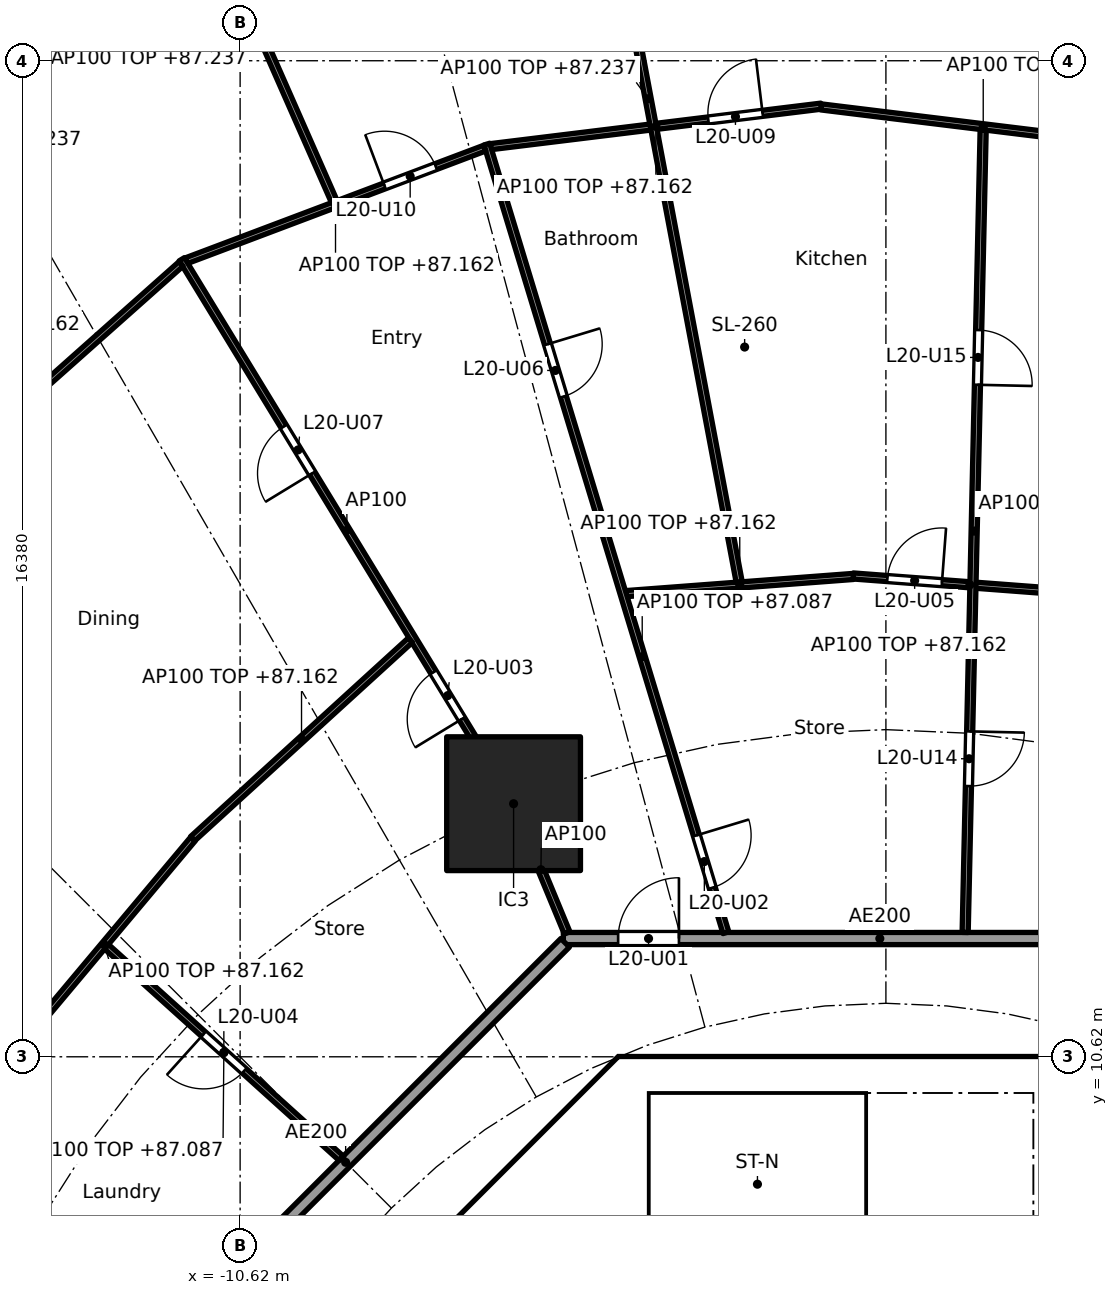
"""IFC4 building model, lengths in metres.
Left out: names, types, materials, properties, quantities, classifications, styles, units other than length and angle.
Written with IfcOpenShell. Run it as: python <this file> out.ifc"""

import sys

from ifc_helpers import new_model, si_unit, direction, frame, frame_2d, origin, origin_2d, place, context, subcontext, project, spatial, polyline, rectangle, outline, extrude, element, fill, save


model = new_model("IFC4")
c1 = context("Model", 3, precision=1e-05, world=origin(), true_north=direction((0.0, 1.0)))
c2 = subcontext(c1, "Body", "Model", "MODEL_VIEW")
j1 = project(units=[si_unit("LENGTHUNIT", "METRE"), si_unit("PLANEANGLEUNIT", "RADIAN")], contexts=[c1])
p1 = place(None, origin())
s1 = spatial("IfcSite", under=j1, at=p1, CompositionType="ELEMENT")
p2 = place(p1, origin())
s2 = spatial("IfcBuilding", under=s1, at=p2, CompositionType="ELEMENT")
p3 = place(p2, frame((0.0, 0.0, 84.4)))
s3 = spatial("IfcBuildingStorey", under=s2, at=p3, CompositionType="ELEMENT", Elevation=84.4)
p4 = place(p3, frame((-6.123, 14.782, 0.0), z_axis=(0.0, 0.0, 1.0), x_axis=(1.0, 0.0, 0.0)))
e1 = element("IfcColumn", 1, at=p4, inside=s3, PredefinedType="COLUMN", context=c2, shape_type="SweptSolid", body=[
    extrude(rectangle(XDim=2.2, YDim=2.2, at=origin_2d()), origin(), (0.0, 0.0, 1.0), 3.7),
])
p5 = place(p3, frame((-4.613, 9.988, 0.0), z_axis=(0.0, 0.0, 1.0), x_axis=(-0.707106781187, -0.707106781187, 0.0)))
e2 = element("IfcWall", 2, at=p5, inside=s3, PredefinedType="SHEAR", context=c2, shape_type="SweptSolid", body=[
    extrude(rectangle(XDim=7.602, YDim=0.6, at=frame_2d((3.801, 0.0))), origin(), (0.0, 0.0, 1.0), 3.44),
])
p6 = place(p5, frame((0.351, 0.0, 0.0)))
e3 = element("IfcOpeningElement", 3, at=p6, cuts=e2, PredefinedType="OPENING", context=c2, shape_type="SweptSolid", body=[
    extrude(rectangle(XDim=1.1, YDim=2.1, at=frame_2d((0.55, 1.05))), frame((0.0, 0.31, 0.0), z_axis=(0.0, -1.0, 0.0), x_axis=(1.0, 0.0, 0.0)), (0.0, 0.0, 1.0), 0.62),
])
p7 = place(p3, frame((-5.8, 4.3, 0.0), z_axis=(0.0, 0.0, 1.0), x_axis=(0.0, 1.0, 0.0)))
e4 = element("IfcWall", 4, at=p7, inside=s3, PredefinedType="PARTITIONING", context=c2, shape_type="SweptSolid", body=[
    extrude(rectangle(XDim=3.927, YDim=0.15, at=frame_2d((1.963, 0.0))), origin(), (0.0, 0.0, 1.0), 3.44),
])
p8 = place(p7, frame((1.551, 0.0, 0.0)))
e5 = element("IfcOpeningElement", 5, at=p8, cuts=e4, PredefinedType="OPENING", context=c2, shape_type="SweptSolid", body=[
    extrude(rectangle(XDim=0.9, YDim=2.1, at=frame_2d((0.45, 1.05))), frame((0.0, 0.085, 0.0), z_axis=(0.0, -1.0, 0.0), x_axis=(1.0, 0.0, 0.0)), (0.0, 0.0, 1.0), 0.17),
])
p9 = place(p3, origin())
e6 = element("IfcWall", 6, at=p9, inside=s3, PredefinedType="SHEAR", context=c2, shape_type="SweptSolid", body=[
    extrude(outline(polyline([(-4.152, 10.025), (-4.401, 9.776), (-4.825, 10.2), (-4.401, 10.625), (4.401, 10.625), (4.825, 10.2), (4.401, 9.776), (4.152, 10.025), (-4.152, 10.025)])), origin(), (0.0, 0.0, 1.0), 3.44),
])
p10 = place(p3, origin())
e7 = element("IfcWall", 7, at=p10, inside=s3, PredefinedType="SOLIDWALL", context=c2, shape_type="SweptSolid", body=[
    extrude(outline(polyline([(-3.9, 7.025), (-4.1, 7.025), (-4.1, 10.025), (-3.9, 10.025), (-3.9, 7.025)])), origin(), (0.0, 0.0, 1.0), 3.44),
])
p11 = place(p3, frame((5.104, 12.565, 0.0), z_axis=(0.0, 0.0, 1.0), x_axis=(-1.0, 0.0, 0.0)))
e8 = element("IfcWall", 8, at=p11, inside=s3, PredefinedType="PARTITIONING", context=c2, shape_type="SweptSolid", body=[
    extrude(rectangle(XDim=10.409, YDim=0.2, at=frame_2d((5.205, 0.0))), origin(), (0.0, 0.0, 1.0), 3.44),
])
p12 = place(p11, frame((8.508, 0.0, 0.0)))
e9 = element("IfcOpeningElement", 9, at=p12, cuts=e8, PredefinedType="OPENING", context=c2, shape_type="SweptSolid", body=[
    extrude(rectangle(XDim=1.0, YDim=2.1, at=frame_2d((0.5, 1.05))), frame((0.0, 0.11, 0.0), z_axis=(0.0, -1.0, 0.0), x_axis=(1.0, 0.0, 0.0)), (0.0, 0.0, 1.0), 0.22),
])
p13 = place(p3, frame((-5.275, 12.494, 0.0), z_axis=(0.0, 0.0, 1.0), x_axis=(-0.707106781187, -0.707106781187, 0.0)))
e10 = element("IfcWall", 10, at=p13, inside=s3, PredefinedType="PARTITIONING", context=c2, shape_type="SweptSolid", body=[
    extrude(rectangle(XDim=10.209, YDim=0.2, at=frame_2d((5.104, 0.0))), origin(), (0.0, 0.0, 1.0), 3.44),
])
p14 = place(p3, frame((3.299, 18.237, 0.0), z_axis=(0.0, 0.0, 1.0), x_axis=(-0.997152243414, 0.075414875552, 0.0)))
e11 = element("IfcWall", 11, at=p14, inside=s3, PredefinedType="PARTITIONING", context=c2, shape_type="SweptSolid", body=[
    extrude(rectangle(XDim=3.846, YDim=0.1, at=frame_2d((1.923, 0.0))), origin(), (0.0, 0.0, 1.0), 2.762),
])
p15 = place(p14, frame((2.385, 0.0, 0.0)))
e12 = element("IfcOpeningElement", 12, at=p15, cuts=e11, PredefinedType="OPENING", context=c2, shape_type="SweptSolid", body=[
    extrude(rectangle(XDim=0.9, YDim=2.1, at=frame_2d((0.45, 1.05))), frame((0.0, 0.06, 0.0), z_axis=(0.0, -1.0, 0.0), x_axis=(1.0, 0.0, 0.0)), (0.0, 0.0, 1.0), 0.12),
])
p16 = place(p3, frame((4.267, 25.587, 0.0), z_axis=(0.0, 0.0, 1.0), x_axis=(-0.992576206119, 0.121624319302, 0.0)))
e13 = element("IfcWall", 13, at=p16, inside=s3, PredefinedType="PARTITIONING", context=c2, shape_type="SweptSolid", body=[
    extrude(rectangle(XDim=5.374, YDim=0.1, at=frame_2d((2.687, 0.0))), origin(), (0.0, 0.0, 1.0), 2.762),
])
p17 = place(p3, frame((1.303, 12.665, 0.0), z_axis=(0.0, 0.0, 1.0), x_axis=(0.022412244057, 0.999748814111, 0.0)))
e14 = element("IfcWall", 14, at=p17, inside=s3, PredefinedType="PARTITIONING", context=c2, shape_type="SweptSolid", body=[
    extrude(rectangle(XDim=13.203, YDim=0.1, at=frame_2d((6.601, 0.0))), origin(), (0.0, 0.0, 1.0), 2.687),
])
p18 = place(p17, frame((2.407, 0.0, 0.0)))
e15 = element("IfcOpeningElement", 15, at=p18, cuts=e14, PredefinedType="OPENING", context=c2, shape_type="SweptSolid", body=[
    extrude(rectangle(XDim=0.9, YDim=2.1, at=frame_2d((0.45, 1.05))), frame((0.0, 0.06, 0.0), z_axis=(0.0, -1.0, 0.0), x_axis=(1.0, 0.0, 0.0)), (0.0, 0.0, 1.0), 0.12),
])
p19 = place(p17, frame((9.009, 0.0, 0.0)))
e16 = element("IfcOpeningElement", 16, at=p19, cuts=e14, PredefinedType="OPENING", context=c2, shape_type="SweptSolid", body=[
    extrude(rectangle(XDim=0.9, YDim=2.1, at=frame_2d((0.45, 1.05))), frame((0.0, 0.06, 0.0), z_axis=(0.0, -1.0, 0.0), x_axis=(1.0, 0.0, 0.0)), (0.0, 0.0, 1.0), 0.12),
])
p20 = place(p3, frame((-0.536, 18.519, 0.0), z_axis=(0.0, 0.0, 1.0), x_axis=(-0.99715294352, -0.075405618017, 0.0)))
e17 = element("IfcWall", 17, at=p20, inside=s3, PredefinedType="PARTITIONING", context=c2, shape_type="SweptSolid", body=[
    extrude(rectangle(XDim=3.746, YDim=0.1, at=frame_2d((1.873, 0.0))), origin(), (0.0, 0.0, 1.0), 2.762),
])
p21 = place(p3, frame((-1.066, 26.253, 0.0), z_axis=(0.0, 0.0, 1.0), x_axis=(-0.992574853421, -0.121635358166, 0.0)))
e18 = element("IfcWall", 18, at=p21, inside=s3, PredefinedType="PARTITIONING", context=c2, shape_type="SweptSolid", body=[
    extrude(rectangle(XDim=5.473, YDim=0.1, at=frame_2d((2.737, 0.0))), origin(), (0.0, 0.0, 1.0), 2.762),
])
p22 = place(p21, frame((0.969, 0.0, 0.0)))
e19 = element("IfcOpeningElement", 19, at=p22, cuts=e18, PredefinedType="OPENING", context=c2, shape_type="SweptSolid", body=[
    extrude(rectangle(XDim=0.9, YDim=2.1, at=frame_2d((0.45, 1.05))), frame((0.0, 0.06, 0.0), z_axis=(0.0, -1.0, 0.0), x_axis=(1.0, 0.0, 0.0)), (0.0, 0.0, 1.0), 0.12),
])
p23 = place(p3, frame((-2.413, 18.427, 0.0), z_axis=(0.0, 0.0, 1.0), x_axis=(-0.185126823719, 0.982714637695, 0.0)))
e20 = element("IfcWall", 20, at=p23, inside=s3, PredefinedType="PARTITIONING", context=c2, shape_type="SweptSolid", body=[
    extrude(rectangle(XDim=16.176, YDim=0.1, at=frame_2d((8.088, 0.0))), origin(), (0.0, 0.0, 1.0), 2.837),
])
p24 = place(p3, frame((-2.631, 12.66, 0.0), z_axis=(0.0, 0.0, 1.0), x_axis=(-0.290161396499, 0.956977723869, 0.0)))
e21 = element("IfcWall", 21, at=p24, inside=s3, PredefinedType="PARTITIONING", context=c2, shape_type="SweptSolid", body=[
    extrude(rectangle(XDim=13.552, YDim=0.1, at=frame_2d((6.776, 0.0))), origin(), (0.0, 0.0, 1.0), 2.687),
])
p25 = place(p24, frame((0.772, 0.0, 0.0)))
e22 = element("IfcOpeningElement", 22, at=p25, cuts=e21, PredefinedType="OPENING", context=c2, shape_type="SweptSolid", body=[
    extrude(rectangle(XDim=0.9, YDim=2.1, at=frame_2d((0.45, 1.05))), frame((0.0, 0.06, 0.0), z_axis=(0.0, -1.0, 0.0), x_axis=(1.0, 0.0, 0.0)), (0.0, 0.0, 1.0), 0.12),
])
p26 = place(p24, frame((9.212, 0.0, 0.0)))
e23 = element("IfcOpeningElement", 23, at=p26, cuts=e21, PredefinedType="OPENING", context=c2, shape_type="SweptSolid", body=[
    extrude(rectangle(XDim=0.9, YDim=2.1, at=frame_2d((0.45, 1.05))), frame((0.0, 0.06, 0.0), z_axis=(0.0, -1.0, 0.0), x_axis=(1.0, 0.0, 0.0)), (0.0, 0.0, 1.0), 0.12),
])
p27 = place(p3, frame((-6.596, 25.563, 0.0), z_axis=(0.0, 0.0, 1.0), x_axis=(-0.9356162121, -0.353018843201, 0.0)))
e24 = element("IfcWall", 24, at=p27, inside=s3, PredefinedType="PARTITIONING", context=c2, shape_type="SweptSolid", body=[
    extrude(rectangle(XDim=5.249, YDim=0.1, at=frame_2d((2.625, 0.0))), origin(), (0.0, 0.0, 1.0), 2.762),
])
p28 = place(p27, frame((0.862, 0.0, 0.0)))
e25 = element("IfcOpeningElement", 25, at=p28, cuts=e24, PredefinedType="OPENING", context=c2, shape_type="SweptSolid", body=[
    extrude(rectangle(XDim=0.9, YDim=2.1, at=frame_2d((0.45, 1.05))), frame((0.0, 0.06, 0.0), z_axis=(0.0, -1.0, 0.0), x_axis=(1.0, 0.0, 0.0)), (0.0, 0.0, 1.0), 0.12),
])
p29 = place(p3, frame((-9.072, 24.683, 0.0), z_axis=(0.0, 0.0, 1.0), x_axis=(-0.403192911159, 0.915115007194, 0.0)))
e26 = element("IfcWall", 26, at=p29, inside=s3, PredefinedType="PARTITIONING", context=c2, shape_type="SweptSolid", body=[
    extrude(rectangle(XDim=8.211, YDim=0.1, at=frame_2d((4.106, 0.0))), origin(), (0.0, 0.0, 1.0), 2.837),
])
p30 = place(p29, frame((3.656, 0.0, 0.0)))
e27 = element("IfcOpeningElement", 27, at=p30, cuts=e26, PredefinedType="OPENING", context=c2, shape_type="SweptSolid", body=[
    extrude(rectangle(XDim=0.9, YDim=2.1, at=frame_2d((0.45, 1.05))), frame((0.0, 0.06, 0.0), z_axis=(0.0, -1.0, 0.0), x_axis=(1.0, 0.0, 0.0)), (0.0, 0.0, 1.0), 0.12),
])
p31 = place(p3, frame((-5.243, 12.657, 0.0), z_axis=(0.0, 0.0, 1.0), x_axis=(-0.382703272338, 0.923871314276, 0.0)))
e28 = element("IfcWall", 28, at=p31, inside=s3, PredefinedType="PARTITIONING", context=c2, shape_type="SweptSolid", body=[
    extrude(rectangle(XDim=2.249, YDim=0.1, at=frame_2d((1.125, 0.0))), origin(), (0.0, 0.0, 1.0), 3.44),
])
p32 = place(p3, frame((-6.149, 14.825, 0.0), z_axis=(0.0, 0.0, 1.0), x_axis=(-0.520411490252, 0.853915616917, 0.0)))
e29 = element("IfcWall", 29, at=p32, inside=s3, PredefinedType="PARTITIONING", context=c2, shape_type="SweptSolid", body=[
    extrude(rectangle(XDim=10.435, YDim=0.1, at=frame_2d((5.218, 0.0))), origin(), (0.0, 0.0, 1.0), 3.44),
])
p33 = place(p32, frame((1.582, 0.0, 0.0)))
e30 = element("IfcOpeningElement", 30, at=p33, cuts=e29, PredefinedType="OPENING", context=c2, shape_type="SweptSolid", body=[
    extrude(rectangle(XDim=0.9, YDim=2.1, at=frame_2d((0.45, 1.05))), frame((0.0, 0.06, 0.0), z_axis=(0.0, -1.0, 0.0), x_axis=(1.0, 0.0, 0.0)), (0.0, 0.0, 1.0), 0.12),
])
p34 = place(p32, frame((6.312, 0.0, 0.0)))
e31 = element("IfcOpeningElement", 31, at=p34, cuts=e29, PredefinedType="OPENING", context=c2, shape_type="SweptSolid", body=[
    extrude(rectangle(XDim=0.9, YDim=2.1, at=frame_2d((0.45, 1.05))), frame((0.0, 0.06, 0.0), z_axis=(0.0, -1.0, 0.0), x_axis=(1.0, 0.0, 0.0)), (0.0, 0.0, 1.0), 0.12),
])
p35 = place(p3, frame((-7.82, 17.472, 0.0), z_axis=(0.0, 0.0, 1.0), x_axis=(-0.73885182489, -0.67386792538, 0.0)))
e32 = element("IfcWall", 32, at=p35, inside=s3, PredefinedType="PARTITIONING", context=c2, shape_type="SweptSolid", body=[
    extrude(rectangle(XDim=4.846, YDim=0.1, at=frame_2d((2.423, 0.0))), origin(), (0.0, 0.0, 1.0), 2.762),
])
p36 = place(p3, frame((-11.591, 23.66, 0.0), z_axis=(0.0, 0.0, 1.0), x_axis=(-0.747429278403, -0.664341383466, 0.0)))
e33 = element("IfcWall", 33, at=p36, inside=s3, PredefinedType="PARTITIONING", context=c2, shape_type="SweptSolid", body=[
    extrude(rectangle(XDim=6.073, YDim=0.1, at=frame_2d((3.037, 0.0))), origin(), (0.0, 0.0, 1.0), 2.762),
])
p37 = place(p3, frame((-11.396, 14.202, 0.0), z_axis=(0.0, 0.0, 1.0), x_axis=(-0.642483859922, -0.766299216847, 0.0)))
e34 = element("IfcWall", 34, at=p37, inside=s3, PredefinedType="PARTITIONING", context=c2, shape_type="SweptSolid", body=[
    extrude(rectangle(XDim=4.537, YDim=0.1, at=frame_2d((2.269, 0.0))), origin(), (0.0, 0.0, 1.0), 2.762),
])
p38 = place(p3, frame((-8.959, 8.952, 0.0), z_axis=(0.0, 0.0, 1.0), x_axis=(-0.742686144764, 0.669639672045, 0.0)))
e35 = element("IfcWall", 35, at=p38, inside=s3, PredefinedType="PARTITIONING", context=c2, shape_type="SweptSolid", body=[
    extrude(rectangle(XDim=5.194, YDim=0.1, at=frame_2d((2.597, 0.0))), origin(), (0.0, 0.0, 1.0), 2.687),
])
p39 = place(p38, frame((2.147, 0.0, 0.0)))
e36 = element("IfcOpeningElement", 36, at=p39, cuts=e35, PredefinedType="OPENING", context=c2, shape_type="SweptSolid", body=[
    extrude(rectangle(XDim=0.9, YDim=2.1, at=frame_2d((0.45, 1.05))), frame((0.0, 0.06, 0.0), z_axis=(0.0, -1.0, 0.0), x_axis=(1.0, 0.0, 0.0)), (0.0, 0.0, 1.0), 0.12),
])
p40 = place(p6, origin())
e37 = element("IfcDoor", 37, at=p40, inside=s3, OperationType="SINGLE_SWING_LEFT", PredefinedType="DOOR", context=c2, shape_type="SweptSolid", body=[
    extrude(rectangle(XDim=1.1, YDim=2.1, at=frame_2d((0.55, 1.05))), frame((0.0, 0.025, 0.0), z_axis=(0.0, -1.0, 0.0), x_axis=(1.0, 0.0, 0.0)), (0.0, 0.0, 1.0), 0.05),
])
fill(e3, e37)
p41 = place(p12, frame((1.0, 0.0, 0.0), x_axis=(-1.0, 0.0, 0.0)))
e38 = element("IfcDoor", 38, at=p41, inside=s3, OperationType="SINGLE_SWING_RIGHT", PredefinedType="DOOR", context=c2, shape_type="SweptSolid", body=[
    extrude(rectangle(XDim=1.0, YDim=2.1, at=frame_2d((0.5, 1.05))), frame((0.0, 0.025, 0.0), z_axis=(0.0, -1.0, 0.0), x_axis=(1.0, 0.0, 0.0)), (0.0, 0.0, 1.0), 0.05),
])
fill(e9, e38)
p42 = place(p25, frame((0.9, 0.0, 0.0), x_axis=(-1.0, 0.0, 0.0)))
e39 = element("IfcDoor", 39, at=p42, inside=s3, OperationType="SINGLE_SWING_LEFT", PredefinedType="DOOR", context=c2, shape_type="SweptSolid", body=[
    extrude(rectangle(XDim=0.9, YDim=2.1, at=frame_2d((0.45, 1.05))), frame((0.0, 0.025, 0.0), z_axis=(0.0, -1.0, 0.0), x_axis=(1.0, 0.0, 0.0)), (0.0, 0.0, 1.0), 0.05),
])
fill(e22, e39)
p43 = place(p33, origin())
e40 = element("IfcDoor", 40, at=p43, inside=s3, OperationType="SINGLE_SWING_LEFT", PredefinedType="DOOR", context=c2, shape_type="SweptSolid", body=[
    extrude(rectangle(XDim=0.9, YDim=2.1, at=frame_2d((0.45, 1.05))), frame((0.0, 0.025, 0.0), z_axis=(0.0, -1.0, 0.0), x_axis=(1.0, 0.0, 0.0)), (0.0, 0.0, 1.0), 0.05),
])
fill(e30, e40)
p44 = place(p39, origin())
e41 = element("IfcDoor", 41, at=p44, inside=s3, OperationType="SINGLE_SWING_RIGHT", PredefinedType="DOOR", context=c2, shape_type="SweptSolid", body=[
    extrude(rectangle(XDim=0.9, YDim=2.1, at=frame_2d((0.45, 1.05))), frame((0.0, 0.025, 0.0), z_axis=(0.0, -1.0, 0.0), x_axis=(1.0, 0.0, 0.0)), (0.0, 0.0, 1.0), 0.05),
])
fill(e36, e41)
p45 = place(p15, frame((0.9, 0.0, 0.0), x_axis=(-1.0, 0.0, 0.0)))
e42 = element("IfcDoor", 42, at=p45, inside=s3, OperationType="SINGLE_SWING_RIGHT", PredefinedType="DOOR", context=c2, shape_type="SweptSolid", body=[
    extrude(rectangle(XDim=0.9, YDim=2.1, at=frame_2d((0.45, 1.05))), frame((0.0, 0.025, 0.0), z_axis=(0.0, -1.0, 0.0), x_axis=(1.0, 0.0, 0.0)), (0.0, 0.0, 1.0), 0.05),
])
fill(e12, e42)
p46 = place(p26, frame((0.9, 0.0, 0.0), x_axis=(-1.0, 0.0, 0.0)))
e43 = element("IfcDoor", 43, at=p46, inside=s3, OperationType="SINGLE_SWING_LEFT", PredefinedType="DOOR", context=c2, shape_type="SweptSolid", body=[
    extrude(rectangle(XDim=0.9, YDim=2.1, at=frame_2d((0.45, 1.05))), frame((0.0, 0.025, 0.0), z_axis=(0.0, -1.0, 0.0), x_axis=(1.0, 0.0, 0.0)), (0.0, 0.0, 1.0), 0.05),
])
fill(e23, e43)
p47 = place(p34, origin())
e44 = element("IfcDoor", 44, at=p47, inside=s3, OperationType="SINGLE_SWING_LEFT", PredefinedType="DOOR", context=c2, shape_type="SweptSolid", body=[
    extrude(rectangle(XDim=0.9, YDim=2.1, at=frame_2d((0.45, 1.05))), frame((0.0, 0.025, 0.0), z_axis=(0.0, -1.0, 0.0), x_axis=(1.0, 0.0, 0.0)), (0.0, 0.0, 1.0), 0.05),
])
fill(e31, e44)
p48 = place(p22, frame((0.9, 0.0, 0.0), x_axis=(-1.0, 0.0, 0.0)))
e45 = element("IfcDoor", 45, at=p48, inside=s3, OperationType="SINGLE_SWING_RIGHT", PredefinedType="DOOR", context=c2, shape_type="SweptSolid", body=[
    extrude(rectangle(XDim=0.9, YDim=2.1, at=frame_2d((0.45, 1.05))), frame((0.0, 0.025, 0.0), z_axis=(0.0, -1.0, 0.0), x_axis=(1.0, 0.0, 0.0)), (0.0, 0.0, 1.0), 0.05),
])
fill(e19, e45)
p49 = place(p28, frame((0.9, 0.0, 0.0), x_axis=(-1.0, 0.0, 0.0)))
e46 = element("IfcDoor", 46, at=p49, inside=s3, OperationType="SINGLE_SWING_LEFT", PredefinedType="DOOR", context=c2, shape_type="SweptSolid", body=[
    extrude(rectangle(XDim=0.9, YDim=2.1, at=frame_2d((0.45, 1.05))), frame((0.0, 0.025, 0.0), z_axis=(0.0, -1.0, 0.0), x_axis=(1.0, 0.0, 0.0)), (0.0, 0.0, 1.0), 0.05),
])
fill(e25, e46)
p50 = place(p18, frame((0.9, 0.0, 0.0), x_axis=(-1.0, 0.0, 0.0)))
e47 = element("IfcDoor", 47, at=p50, inside=s3, OperationType="SINGLE_SWING_LEFT", PredefinedType="DOOR", context=c2, shape_type="SweptSolid", body=[
    extrude(rectangle(XDim=0.9, YDim=2.1, at=frame_2d((0.45, 1.05))), frame((0.0, 0.025, 0.0), z_axis=(0.0, -1.0, 0.0), x_axis=(1.0, 0.0, 0.0)), (0.0, 0.0, 1.0), 0.05),
])
fill(e15, e47)
p51 = place(p19, frame((0.9, 0.0, 0.0), x_axis=(-1.0, 0.0, 0.0)))
e48 = element("IfcDoor", 48, at=p51, inside=s3, OperationType="SINGLE_SWING_RIGHT", PredefinedType="DOOR", context=c2, shape_type="SweptSolid", body=[
    extrude(rectangle(XDim=0.9, YDim=2.1, at=frame_2d((0.45, 1.05))), frame((0.0, 0.025, 0.0), z_axis=(0.0, -1.0, 0.0), x_axis=(1.0, 0.0, 0.0)), (0.0, 0.0, 1.0), 0.05),
])
fill(e16, e48)
save(model, sys.argv[1])
